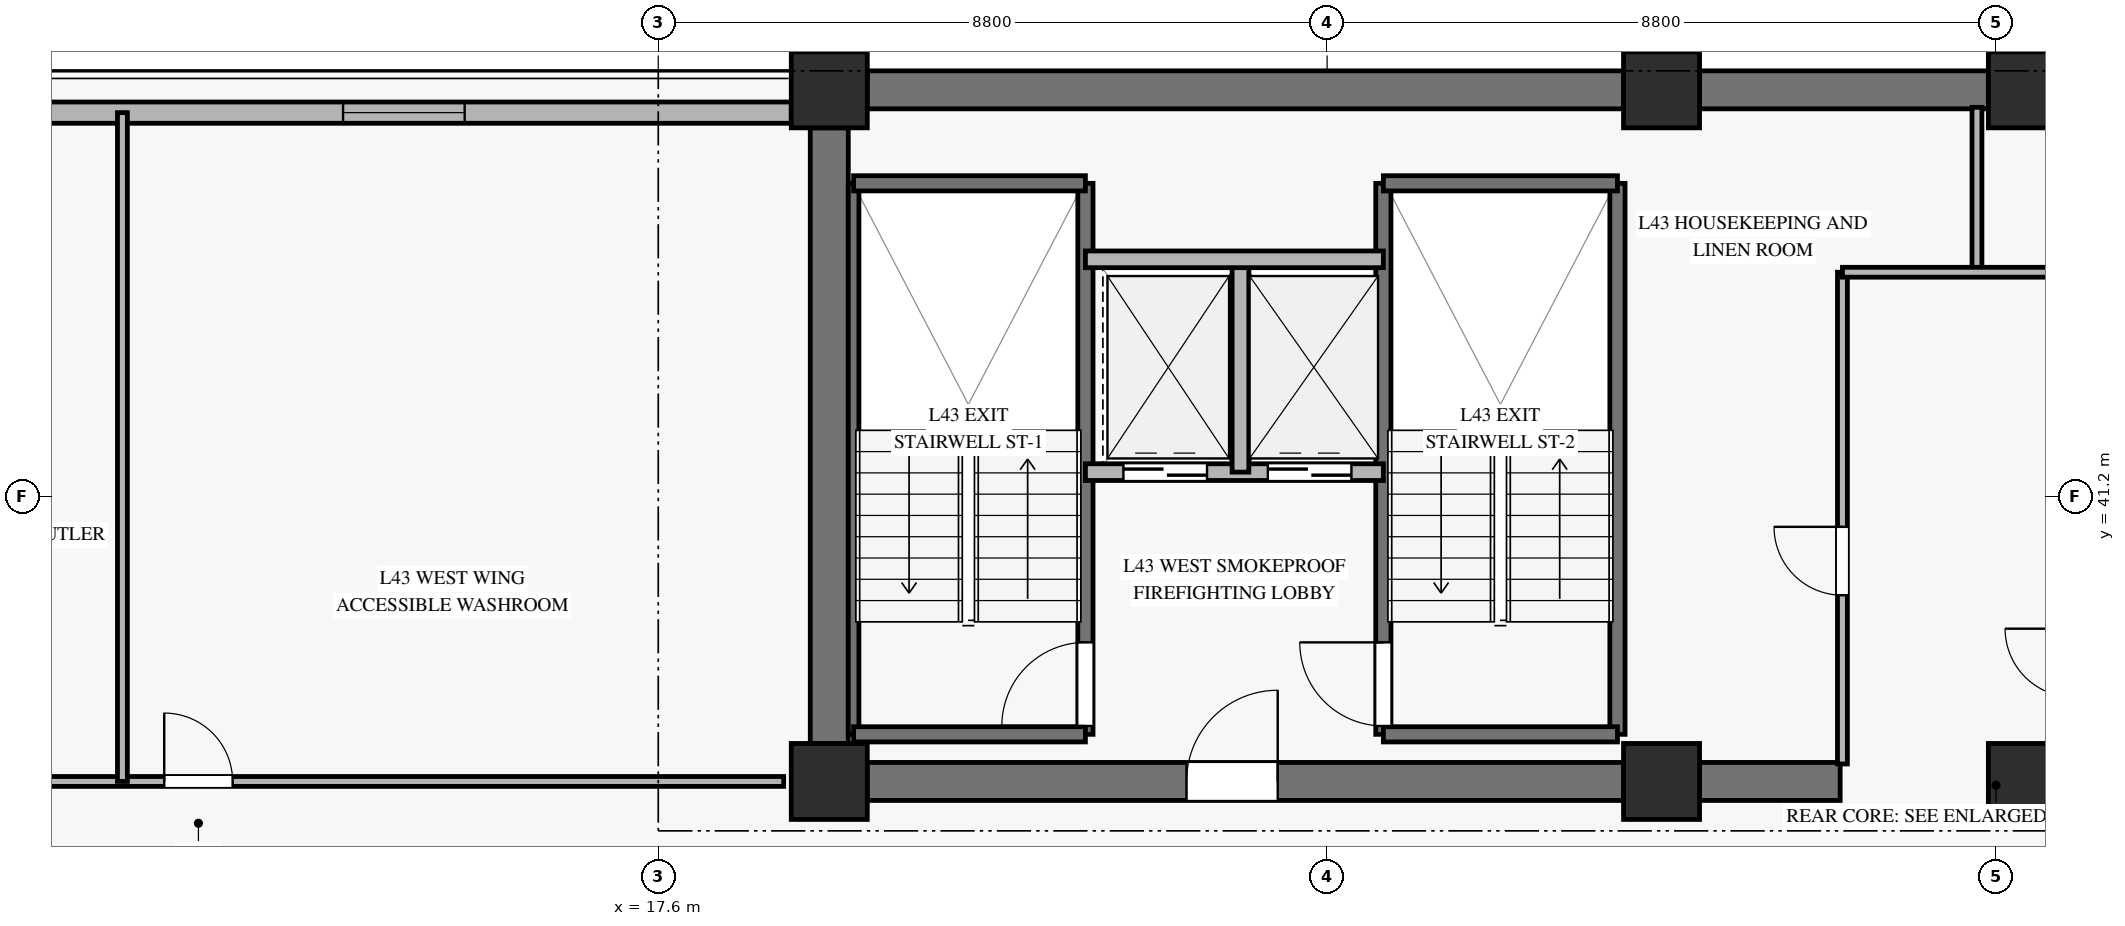
"""IFC4 building model, lengths in metres.
Left out: names, types, materials, properties, quantities, classifications, styles, units other than length and angle.
Written with IfcOpenShell. Run it as: python <this file> out.ifc"""

import sys

from ifc_helpers import new_model, si_unit, direction, frame, frame_2d, origin, origin_2d, place, context, subcontext, project, spatial, rectangle, extrude, source, transform, mapped, element, fill, save


model = new_model("IFC4")
c1 = context("Model", 3, precision=1e-05, world=origin(), true_north=direction((0.0, 1.0)))
c2 = subcontext(c1, "Body", "Model", "MODEL_VIEW")
j1 = project(units=[si_unit("LENGTHUNIT", "METRE"), si_unit("PLANEANGLEUNIT", "RADIAN")], contexts=[c1])
p1 = place(None, origin())
s1 = spatial("IfcSite", under=j1, at=p1, CompositionType="ELEMENT")
p2 = place(p1, origin())
s2 = spatial("IfcBuilding", under=s1, at=p2, CompositionType="ELEMENT")
p3 = place(p2, frame((0.0, 0.0, 173.7)))
s3 = spatial("IfcBuildingStorey", under=s2, at=p3, CompositionType="ELEMENT", Elevation=173.7)
m1 = source(origin(), c2, "Body", "SweptSolid", [
    extrude(rectangle(XDim=1.0, YDim=1.0, at=origin_2d()), origin(), (0.0, 0.0, 1.0), 3.27),
])
for number, where, z_axis, x_axis in (
    (1, (19.85, 37.45, 0.0), (0.0, 0.0, 1.0), (1.0, 0.0, 0.0)),
    (2, (19.85, 46.55, 0.0), (0.0, 0.0, 1.0), (1.0, 0.0, 0.0)),
    (3, (30.8, 37.45, 0.0), (0.0, 0.0, 1.0), (1.0, 0.0, 0.0)),
    (4, (30.8, 46.55, 0.0), (0.0, 0.0, 1.0), (1.0, 0.0, 0.0)),
    (5, (35.6, 37.45, 0.0), (0.0, 0.0, 1.0), (1.0, 0.0, 0.0)),
    (6, (35.6, 46.55, 0.0), (0.0, 0.0, 1.0), (1.0, 0.0, 0.0)),
):
    element("IfcColumn", number, at=place(p3, frame(where, z_axis=z_axis, x_axis=x_axis)), inside=s3, PredefinedType="PILASTER", context=c2, shape_type="MappedRepresentation", body=[
        mapped(m1, transform((0.0, 0.0, 0.0), x_axis=(1.0, 0.0, 0.0), y_axis=(0.0, 1.0, 0.0), z_axis=(0.0, 0.0, 1.0), scale=1.0)),
    ])
p4 = place(p3, frame((20.35, 46.55, 0.0), z_axis=(0.0, 0.0, 1.0), x_axis=(1.0, 0.0, 0.0)))
e7 = element("IfcWall", 7, at=p4, inside=s3, PredefinedType="SHEAR", context=c2, shape_type="SweptSolid", body=[
    extrude(rectangle(XDim=9.95, YDim=0.5, at=frame_2d((4.975, 0.0))), origin(), (0.0, 0.0, 1.0), 3.27),
])
p5 = place(p3, frame((31.3, 46.55, 0.0), z_axis=(0.0, 0.0, 1.0), x_axis=(1.0, 0.0, 0.0)))
e8 = element("IfcWall", 8, at=p5, inside=s3, PredefinedType="SHEAR", context=c2, shape_type="SweptSolid", body=[
    extrude(rectangle(XDim=3.8, YDim=0.5, at=frame_2d((1.9, 0.0))), origin(), (0.0, 0.0, 1.0), 3.27),
])
p6 = place(p3, frame((20.35, 37.45, 0.0), z_axis=(0.0, 0.0, 1.0), x_axis=(1.0, 0.0, 0.0)))
e9 = element("IfcWall", 9, at=p6, inside=s3, PredefinedType="SHEAR", context=c2, shape_type="SweptSolid", body=[
    extrude(rectangle(XDim=9.95, YDim=0.5, at=frame_2d((4.975, 0.0))), origin(), (0.0, 0.0, 1.0), 3.27),
])
p7 = place(p6, frame((4.2, 0.0, 0.0)))
e10 = element("IfcOpeningElement", 10, at=p7, cuts=e9, PredefinedType="OPENING", context=c2, shape_type="SweptSolid", body=[
    extrude(rectangle(XDim=1.2, YDim=2.15, at=frame_2d((0.6, 1.075))), frame((0.0, 0.26, 0.0), z_axis=(0.0, -1.0, 0.0), x_axis=(1.0, 0.0, 0.0)), (0.0, 0.0, 1.0), 0.52),
])
p8 = place(p3, frame((31.3, 37.45, 0.0), z_axis=(0.0, 0.0, 1.0), x_axis=(1.0, 0.0, 0.0)))
e11 = element("IfcWall", 11, at=p8, inside=s3, PredefinedType="SHEAR", context=c2, shape_type="SweptSolid", body=[
    extrude(rectangle(XDim=1.85, YDim=0.5, at=frame_2d((0.925, 0.0))), origin(), (0.0, 0.0, 1.0), 3.27),
])
p9 = place(p3, frame((19.85, 37.95, 0.0), z_axis=(0.0, 0.0, 1.0), x_axis=(0.0, 1.0, 0.0)))
e12 = element("IfcWall", 12, at=p9, inside=s3, PredefinedType="SHEAR", context=c2, shape_type="SweptSolid", body=[
    extrude(rectangle(XDim=8.1, YDim=0.5, at=frame_2d((4.05, 0.0))), origin(), (0.0, 0.0, 1.0), 3.27),
])
p10 = place(p3, frame((9.156, 46.25, 0.0), z_axis=(0.0, 0.0, 1.0), x_axis=(1.0, 0.0, 0.0)))
e13 = element("IfcWall", 13, at=p10, inside=s3, PredefinedType="SOLIDWALL", context=c2, shape_type="SweptSolid", body=[
    extrude(rectangle(XDim=10.194, YDim=0.28, at=frame_2d((5.097, 0.0))), origin(), (0.0, 0.0, 1.0), 2.75),
])
p11 = place(p10, frame((4.297, 0.0, 0.45)))
e14 = element("IfcOpeningElement", 14, at=p11, cuts=e13, PredefinedType="OPENING", context=c2, shape_type="SweptSolid", body=[
    extrude(rectangle(XDim=1.6, YDim=2.0, at=frame_2d((0.8, 1.0))), frame((0.0, 0.15, 0.0), z_axis=(0.0, -1.0, 0.0), x_axis=(1.0, 0.0, 0.0)), (0.0, 0.0, 1.0), 0.3),
])
p12 = place(p3, frame((20.17, 38.07, 0.0), z_axis=(0.0, 0.0, 1.0), x_axis=(0.0, 1.0, 0.0)))
e15 = element("IfcWall", 15, at=p12, inside=s3, PredefinedType="SOLIDWALL", context=c2, shape_type="SweptSolid", body=[
    extrude(rectangle(XDim=7.25, YDim=0.14, at=frame_2d((3.625, 0.0))), origin(), (0.0, 0.0, 1.0), 3.5),
])
p13 = place(p3, frame((23.22, 38.07, 0.0), z_axis=(0.0, 0.0, 1.0), x_axis=(0.0, 1.0, 0.0)))
e16 = element("IfcWall", 16, at=p13, inside=s3, PredefinedType="SOLIDWALL", context=c2, shape_type="SweptSolid", body=[
    extrude(rectangle(XDim=7.25, YDim=0.2, at=frame_2d((3.625, 0.0))), origin(), (0.0, 0.0, 1.0), 3.5),
])
p14 = place(p13, frame((0.11, 0.0, 0.0)))
e17 = element("IfcOpeningElement", 17, at=p14, cuts=e16, PredefinedType="OPENING", context=c2, shape_type="SweptSolid", body=[
    extrude(rectangle(XDim=1.1, YDim=2.15, at=frame_2d((0.55, 1.075))), frame((0.0, 0.11, 0.0), z_axis=(0.0, -1.0, 0.0), x_axis=(1.0, 0.0, 0.0)), (0.0, 0.0, 1.0), 0.22),
])
for number, where, z_axis, x_axis in (
    (18, (20.17, 45.32, 0.0), (0.0, 0.0, 1.0), (1.0, 0.0, 0.0)),
    (19, (20.17, 38.07, 0.0), (0.0, 0.0, 1.0), (1.0, 0.0, 0.0)),
):
    element("IfcWall", number, at=place(p3, frame(where, z_axis=z_axis, x_axis=x_axis)), inside=s3, PredefinedType="SOLIDWALL", context=c2, shape_type="SweptSolid", body=[
        extrude(rectangle(XDim=3.05, YDim=0.2, at=frame_2d((1.525, 0.0))), origin(), (0.0, 0.0, 1.0), 3.5),
    ])
p15 = place(p3, frame((27.14, 38.07, 0.0), z_axis=(0.0, 0.0, 1.0), x_axis=(0.0, 1.0, 0.0)))
e20 = element("IfcWall", 20, at=p15, inside=s3, PredefinedType="SOLIDWALL", context=c2, shape_type="SweptSolid", body=[
    extrude(rectangle(XDim=7.25, YDim=0.2, at=frame_2d((3.625, 0.0))), origin(), (0.0, 0.0, 1.0), 3.5),
])
p16 = place(p15, frame((0.11, 0.0, 0.0)))
e21 = element("IfcOpeningElement", 21, at=p16, cuts=e20, PredefinedType="OPENING", context=c2, shape_type="SweptSolid", body=[
    extrude(rectangle(XDim=1.1, YDim=2.15, at=frame_2d((0.55, 1.075))), frame((0.0, 0.11, 0.0), z_axis=(0.0, -1.0, 0.0), x_axis=(1.0, 0.0, 0.0)), (0.0, 0.0, 1.0), 0.22),
])
p17 = place(p3, frame((30.22, 38.07, 0.0), z_axis=(0.0, 0.0, 1.0), x_axis=(0.0, 1.0, 0.0)))
e22 = element("IfcWall", 22, at=p17, inside=s3, PredefinedType="SOLIDWALL", context=c2, shape_type="SweptSolid", body=[
    extrude(rectangle(XDim=7.25, YDim=0.2, at=frame_2d((3.625, 0.0))), origin(), (0.0, 0.0, 1.0), 3.5),
])
for number, where, z_axis, x_axis in (
    (23, (27.14, 45.32, 0.0), (0.0, 0.0, 1.0), (1.0, 0.0, 0.0)),
    (24, (27.14, 38.07, 0.0), (0.0, 0.0, 1.0), (1.0, 0.0, 0.0)),
):
    element("IfcWall", number, at=place(p3, frame(where, z_axis=z_axis, x_axis=x_axis)), inside=s3, PredefinedType="SOLIDWALL", context=c2, shape_type="SweptSolid", body=[
        extrude(rectangle(XDim=3.08, YDim=0.2, at=frame_2d((1.54, 0.0))), origin(), (0.0, 0.0, 1.0), 3.5),
    ])
p18 = place(p3, frame((23.22, 41.52, 0.0), z_axis=(0.0, 0.0, 1.0), x_axis=(1.0, 0.0, 0.0)))
e25 = element("IfcWall", 25, at=p18, inside=s3, PredefinedType="SOLIDWALL", context=c2, shape_type="SweptSolid", body=[
    extrude(rectangle(XDim=3.92, YDim=0.22, at=frame_2d((1.96, 0.0))), origin(), (0.0, 0.0, 1.0), 3.27),
])
p19 = place(p18, frame((0.5, 0.0, 0.0)))
e26 = element("IfcOpeningElement", 26, at=p19, cuts=e25, PredefinedType="OPENING", context=c2, shape_type="SweptSolid", body=[
    extrude(rectangle(XDim=1.1, YDim=2.2, at=frame_2d((0.55, 1.1))), frame((0.0, 0.12, 0.0), z_axis=(0.0, -1.0, 0.0), x_axis=(1.0, 0.0, 0.0)), (0.0, 0.0, 1.0), 0.24),
])
p20 = place(p18, frame((2.4, 0.0, 0.0)))
e27 = element("IfcOpeningElement", 27, at=p20, cuts=e25, PredefinedType="OPENING", context=c2, shape_type="SweptSolid", body=[
    extrude(rectangle(XDim=1.1, YDim=2.2, at=frame_2d((0.55, 1.1))), frame((0.0, 0.12, 0.0), z_axis=(0.0, -1.0, 0.0), x_axis=(1.0, 0.0, 0.0)), (0.0, 0.0, 1.0), 0.24),
])
p21 = place(p3, frame((25.26, 41.52, 0.0), z_axis=(0.0, 0.0, 1.0), x_axis=(0.0, 1.0, 0.0)))
e28 = element("IfcWall", 28, at=p21, inside=s3, PredefinedType="SOLIDWALL", context=c2, shape_type="SweptSolid", body=[
    extrude(rectangle(XDim=2.8, YDim=0.22, at=frame_2d((1.4, 0.0))), origin(), (0.0, 0.0, 1.0), 3.27),
])
p22 = place(p3, frame((23.22, 44.32, 0.0), z_axis=(0.0, 0.0, 1.0), x_axis=(1.0, 0.0, 0.0)))
e29 = element("IfcWall", 29, at=p22, inside=s3, PredefinedType="SOLIDWALL", context=c2, shape_type="SweptSolid", body=[
    extrude(rectangle(XDim=3.92, YDim=0.22, at=frame_2d((1.96, 0.0))), origin(), (0.0, 0.0, 1.0), 3.27),
])
p23 = place(p3, frame((33.18, 37.68, 0.0), z_axis=(0.0, 0.0, 1.0), x_axis=(0.0, 1.0, 0.0)))
e30 = element("IfcWall", 30, at=p23, inside=s3, PredefinedType="PARTITIONING", context=c2, shape_type="SweptSolid", body=[
    extrude(rectangle(XDim=6.47, YDim=0.13, at=frame_2d((3.235, 0.0))), origin(), (0.0, 0.0, 1.0), 2.355),
])
p24 = place(p23, frame((2.22, 0.0, 0.0)))
e31 = element("IfcOpeningElement", 31, at=p24, cuts=e30, PredefinedType="OPENING", context=c2, shape_type="SweptSolid", body=[
    extrude(rectangle(XDim=0.9, YDim=2.1, at=frame_2d((0.45, 1.05))), frame((0.0, 0.075, 0.0), z_axis=(0.0, -1.0, 0.0), x_axis=(1.0, 0.0, 0.0)), (0.0, 0.0, 1.0), 0.15),
])
p25 = place(p3, frame((34.95, 44.15, 0.0), z_axis=(0.0, 0.0, 1.0), x_axis=(0.0, 1.0, 0.0)))
e32 = element("IfcWall", 32, at=p25, inside=s3, PredefinedType="PARTITIONING", context=c2, shape_type="SweptSolid", body=[
    extrude(rectangle(XDim=2.17, YDim=0.13, at=frame_2d((1.085, 0.0))), origin(), (0.0, 0.0, 1.0), 3.27),
])
p26 = place(p3, frame((33.18, 44.15, 0.0), z_axis=(0.0, 0.0, 1.0), x_axis=(1.0, 0.0, 0.0)))
e33 = element("IfcWall", 33, at=p26, inside=s3, PredefinedType="PARTITIONING", context=c2, shape_type="SweptSolid", body=[
    extrude(rectangle(XDim=2.97, YDim=0.13, at=frame_2d((1.485, 0.0))), origin(), (0.0, 0.0, 1.0), 2.555),
])
p27 = place(p3, frame((5.919, 37.45, 0.0), z_axis=(0.0, 0.0, 1.0), x_axis=(1.0, 0.0, 0.0)))
e34 = element("IfcWall", 34, at=p27, inside=s3, PredefinedType="PARTITIONING", context=c2, shape_type="SweptSolid", body=[
    extrude(rectangle(XDim=13.331, YDim=0.13, at=frame_2d((6.666, 0.0))), origin(), (0.0, 0.0, 1.0), 2.755),
])
p28 = place(p27, frame((0.9, 0.0, 0.0)))
e35 = element("IfcOpeningElement", 35, at=p28, cuts=e34, PredefinedType="OPENING", context=c2, shape_type="SweptSolid", body=[
    extrude(rectangle(XDim=0.95, YDim=2.1, at=frame_2d((0.475, 1.05))), frame((0.0, 0.075, 0.0), z_axis=(0.0, -1.0, 0.0), x_axis=(1.0, 0.0, 0.0)), (0.0, 0.0, 1.0), 0.15),
])
p29 = place(p27, frame((5.181, 0.0, 0.0)))
e36 = element("IfcOpeningElement", 36, at=p29, cuts=e34, PredefinedType="OPENING", context=c2, shape_type="SweptSolid", body=[
    extrude(rectangle(XDim=0.9, YDim=2.1, at=frame_2d((0.45, 1.05))), frame((0.0, 0.075, 0.0), z_axis=(0.0, -1.0, 0.0), x_axis=(1.0, 0.0, 0.0)), (0.0, 0.0, 1.0), 0.15),
])
p30 = place(p3, frame((10.55, 37.45, 0.0), z_axis=(0.0, 0.0, 1.0), x_axis=(0.0, 1.0, 0.0)))
e37 = element("IfcWall", 37, at=p30, inside=s3, PredefinedType="PARTITIONING", context=c2, shape_type="SweptSolid", body=[
    extrude(rectangle(XDim=8.8, YDim=0.13, at=frame_2d((4.4, 0.0))), origin(), (0.0, 0.0, 1.0), 3.27),
])
m2 = source(origin(), c2, "Body", "SweptSolid", [
    extrude(rectangle(XDim=1.6, YDim=2.0, at=frame_2d((0.8, 1.0))), frame((0.0, 0.03, 0.0), z_axis=(0.0, -1.0, 0.0), x_axis=(1.0, 0.0, 0.0)), (0.0, 0.0, 1.0), 0.06),
])
p31 = place(p11, origin())
e38 = element("IfcWindow", 38, at=p31, inside=s3, PartitioningType="SINGLE_PANEL", PredefinedType="WINDOW", context=c2, shape_type="MappedRepresentation", body=[
    mapped(m2, transform((0.0, 0.0, 0.0), x_axis=(1.0, 0.0, 0.0), y_axis=(0.0, 1.0, 0.0), z_axis=(0.0, 0.0, 1.0), scale=1.0)),
])
fill(e14, e38)
m3 = source(origin(), c2, "Body", "SweptSolid", [
    extrude(rectangle(XDim=1.1, YDim=2.15, at=frame_2d((0.55, 1.075))), frame((0.0, 0.025, 0.0), z_axis=(0.0, -1.0, 0.0), x_axis=(1.0, 0.0, 0.0)), (0.0, 0.0, 1.0), 0.05),
])
p32 = place(p14, origin())
e39 = element("IfcDoor", 39, at=p32, inside=s3, OperationType="SINGLE_SWING_LEFT", PredefinedType="DOOR", context=c2, shape_type="MappedRepresentation", body=[
    mapped(m3, transform((0.0, 0.0, 0.0), x_axis=(1.0, 0.0, 0.0), y_axis=(0.0, 1.0, 0.0), z_axis=(0.0, 0.0, 1.0), scale=1.0)),
])
fill(e17, e39)
p33 = place(p16, origin())
e40 = element("IfcDoor", 40, at=p33, inside=s3, OperationType="SINGLE_SWING_RIGHT", PredefinedType="DOOR", context=c2, shape_type="MappedRepresentation", body=[
    mapped(m3, transform((0.0, 0.0, 0.0), x_axis=(1.0, 0.0, 0.0), y_axis=(0.0, 1.0, 0.0), z_axis=(0.0, 0.0, 1.0), scale=1.0)),
])
fill(e21, e40)
m4 = source(origin(), c2, "Body", "SweptSolid", [
    extrude(rectangle(XDim=1.1, YDim=2.2, at=frame_2d((0.55, 1.1))), frame((0.0, 0.025, 0.0), z_axis=(0.0, -1.0, 0.0), x_axis=(1.0, 0.0, 0.0)), (0.0, 0.0, 1.0), 0.05),
])
p34 = place(p19, origin())
e41 = element("IfcDoor", 41, at=p34, inside=s3, OperationType="SLIDING_TO_LEFT", PredefinedType="DOOR", context=c2, shape_type="MappedRepresentation", body=[
    mapped(m4, transform((0.0, 0.0, 0.0), x_axis=(1.0, 0.0, 0.0), y_axis=(0.0, 1.0, 0.0), z_axis=(0.0, 0.0, 1.0), scale=1.0)),
])
fill(e26, e41)
p35 = place(p20, origin())
e42 = element("IfcDoor", 42, at=p35, inside=s3, OperationType="SLIDING_TO_LEFT", PredefinedType="DOOR", context=c2, shape_type="MappedRepresentation", body=[
    mapped(m4, transform((0.0, 0.0, 0.0), x_axis=(1.0, 0.0, 0.0), y_axis=(0.0, 1.0, 0.0), z_axis=(0.0, 0.0, 1.0), scale=1.0)),
])
fill(e27, e42)
m5 = source(origin(), c2, "Body", "SweptSolid", [
    extrude(rectangle(XDim=1.2, YDim=2.15, at=frame_2d((0.6, 1.075))), frame((0.0, 0.025, 0.0), z_axis=(0.0, -1.0, 0.0), x_axis=(1.0, 0.0, 0.0)), (0.0, 0.0, 1.0), 0.05),
])
p36 = place(p7, origin())
e43 = element("IfcDoor", 43, at=p36, inside=s3, OperationType="SINGLE_SWING_RIGHT", PredefinedType="DOOR", context=c2, shape_type="MappedRepresentation", body=[
    mapped(m5, transform((0.0, 0.0, 0.0), x_axis=(1.0, 0.0, 0.0), y_axis=(0.0, 1.0, 0.0), z_axis=(0.0, 0.0, 1.0), scale=1.0)),
])
fill(e10, e43)
m6 = source(origin(), c2, "Body", "SweptSolid", [
    extrude(rectangle(XDim=0.9, YDim=2.1, at=frame_2d((0.45, 1.05))), frame((0.0, 0.025, 0.0), z_axis=(0.0, -1.0, 0.0), x_axis=(1.0, 0.0, 0.0)), (0.0, 0.0, 1.0), 0.05),
])
p37 = place(p24, origin())
e44 = element("IfcDoor", 44, at=p37, inside=s3, OperationType="SINGLE_SWING_RIGHT", PredefinedType="DOOR", context=c2, shape_type="MappedRepresentation", body=[
    mapped(m6, transform((0.0, 0.0, 0.0), x_axis=(1.0, 0.0, 0.0), y_axis=(0.0, 1.0, 0.0), z_axis=(0.0, 0.0, 1.0), scale=1.0)),
])
fill(e31, e44)
p38 = place(p29, origin())
e45 = element("IfcDoor", 45, at=p38, inside=s3, OperationType="SINGLE_SWING_LEFT", PredefinedType="DOOR", context=c2, shape_type="MappedRepresentation", body=[
    mapped(m6, transform((0.0, 0.0, 0.0), x_axis=(1.0, 0.0, 0.0), y_axis=(0.0, 1.0, 0.0), z_axis=(0.0, 0.0, 1.0), scale=1.0)),
])
fill(e36, e45)
save(model, sys.argv[1])
